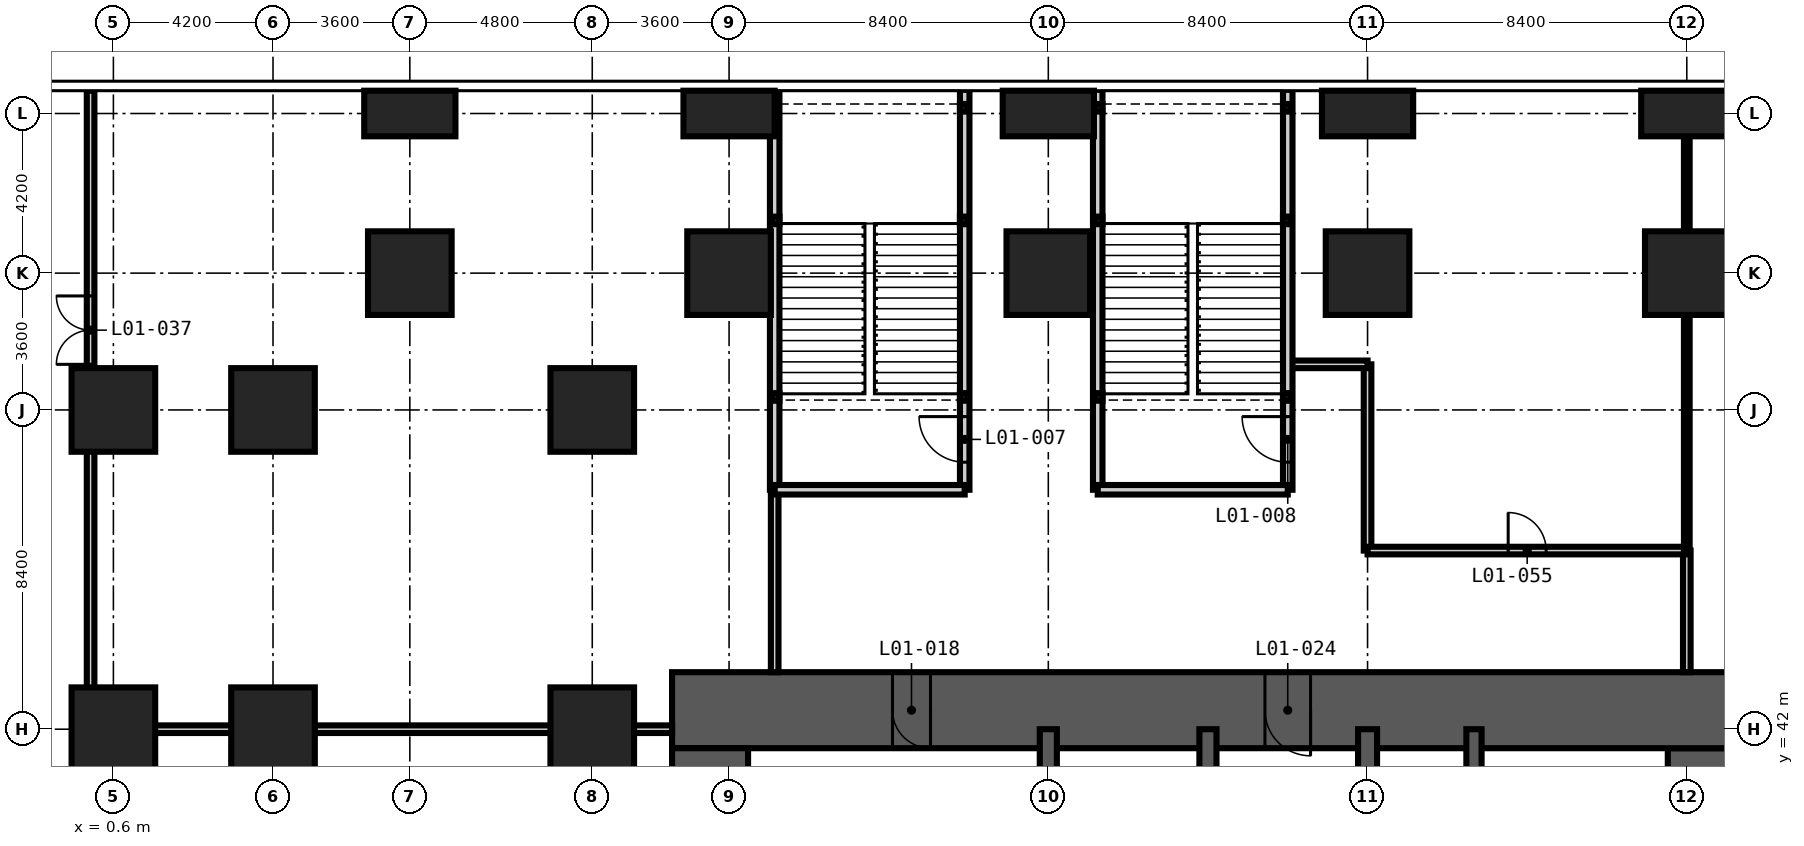
"""IFC4 building model, lengths in metres.
Left out: names, types, materials, properties, quantities, classifications, styles, units other than length and angle.
Written with IfcOpenShell. Run it as: python <this file> out.ifc"""

import sys

from ifc_helpers import new_model, si_unit, direction, frame, frame_2d, origin, origin_2d, place, context, subcontext, project, spatial, rectangle, hollow_rectangle, extrude, element, fill, save


model = new_model("IFC4")
c1 = context("Model", 3, precision=1e-05, world=origin(), true_north=direction((0.0, 1.0)))
c2 = subcontext(c1, "Body", "Model", "MODEL_VIEW")
j1 = project(units=[si_unit("LENGTHUNIT", "METRE"), si_unit("PLANEANGLEUNIT", "RADIAN")], contexts=[c1])
p1 = place(None, origin())
s1 = spatial("IfcSite", under=j1, at=p1, CompositionType="ELEMENT")
p2 = place(p1, origin())
s2 = spatial("IfcBuilding", under=s1, at=p2, CompositionType="ELEMENT")
p3 = place(p2, frame((0.0, 0.0, 6.0)))
s3 = spatial("IfcBuildingStorey", under=s2, at=p3, CompositionType="ELEMENT", Elevation=6.0)
for number, where, z_axis, x_axis in (
    (1, (0.6, 42.0, -0.3), (0.0, 0.0, 1.0), (1.0, 0.0, 0.0)),
    (2, (0.6, 50.4, -0.3), (0.0, 0.0, 1.0), (1.0, 0.0, 0.0)),
    (3, (4.8, 42.0, -0.3), (0.0, 0.0, 1.0), (1.0, 0.0, 0.0)),
    (4, (4.8, 50.4, -0.3), (0.0, 0.0, 1.0), (1.0, 0.0, 0.0)),
    (5, (8.4, 54.0, -0.3), (0.0, 0.0, 1.0), (1.0, 0.0, 0.0)),
):
    element("IfcColumn", number, at=place(p3, frame(where, z_axis=z_axis, x_axis=x_axis)), inside=s3, PredefinedType="COLUMN", context=c2, shape_type="SweptSolid", body=[
        extrude(rectangle(XDim=2.2, YDim=2.2, at=origin_2d()), origin(), (0.0, 0.0, 1.0), 6.0),
    ])
p4 = place(p3, frame((8.4, 58.2, -0.3), z_axis=(0.0, 0.0, 1.0), x_axis=(1.0, 0.0, 0.0)))
e6 = element("IfcColumn", 6, at=p4, inside=s3, PredefinedType="COLUMN", context=c2, shape_type="SweptSolid", body=[
    extrude(rectangle(XDim=2.4, YDim=1.2, at=origin_2d()), origin(), (0.0, 0.0, 1.0), 6.0),
])
for number, where, z_axis, x_axis in (
    (7, (13.2, 42.0, -0.3), (0.0, 0.0, 1.0), (1.0, 0.0, 0.0)),
    (8, (13.2, 50.4, -0.3), (0.0, 0.0, 1.0), (1.0, 0.0, 0.0)),
    (9, (16.8, 54.0, -0.3), (0.0, 0.0, 1.0), (1.0, 0.0, 0.0)),
):
    element("IfcColumn", number, at=place(p3, frame(where, z_axis=z_axis, x_axis=x_axis)), inside=s3, PredefinedType="COLUMN", context=c2, shape_type="SweptSolid", body=[
        extrude(rectangle(XDim=2.2, YDim=2.2, at=origin_2d()), origin(), (0.0, 0.0, 1.0), 6.0),
    ])
p5 = place(p3, frame((16.8, 58.2, -0.3), z_axis=(0.0, 0.0, 1.0), x_axis=(1.0, 0.0, 0.0)))
e10 = element("IfcColumn", 10, at=p5, inside=s3, PredefinedType="COLUMN", context=c2, shape_type="SweptSolid", body=[
    extrude(rectangle(XDim=2.4, YDim=1.2, at=origin_2d()), origin(), (0.0, 0.0, 1.0), 6.0),
])
p6 = place(p3, frame((25.2, 54.0, -0.3), z_axis=(0.0, 0.0, 1.0), x_axis=(1.0, 0.0, 0.0)))
e11 = element("IfcColumn", 11, at=p6, inside=s3, PredefinedType="COLUMN", context=c2, shape_type="SweptSolid", body=[
    extrude(rectangle(XDim=2.2, YDim=2.2, at=origin_2d()), origin(), (0.0, 0.0, 1.0), 6.0),
])
p7 = place(p3, frame((25.2, 58.2, -0.3), z_axis=(0.0, 0.0, 1.0), x_axis=(1.0, 0.0, 0.0)))
e12 = element("IfcColumn", 12, at=p7, inside=s3, PredefinedType="COLUMN", context=c2, shape_type="SweptSolid", body=[
    extrude(rectangle(XDim=2.4, YDim=1.2, at=origin_2d()), origin(), (0.0, 0.0, 1.0), 6.0),
])
p8 = place(p3, frame((33.6, 54.0, -0.3), z_axis=(0.0, 0.0, 1.0), x_axis=(1.0, 0.0, 0.0)))
e13 = element("IfcColumn", 13, at=p8, inside=s3, PredefinedType="COLUMN", context=c2, shape_type="SweptSolid", body=[
    extrude(rectangle(XDim=2.2, YDim=2.2, at=origin_2d()), origin(), (0.0, 0.0, 1.0), 6.0),
])
p9 = place(p3, frame((33.6, 58.2, -0.3), z_axis=(0.0, 0.0, 1.0), x_axis=(1.0, 0.0, 0.0)))
e14 = element("IfcColumn", 14, at=p9, inside=s3, PredefinedType="COLUMN", context=c2, shape_type="SweptSolid", body=[
    extrude(rectangle(XDim=2.4, YDim=1.2, at=origin_2d()), origin(), (0.0, 0.0, 1.0), 6.0),
])
p10 = place(p3, frame((42.0, 54.0, -0.3), z_axis=(0.0, 0.0, 1.0), x_axis=(1.0, 0.0, 0.0)))
e15 = element("IfcColumn", 15, at=p10, inside=s3, PredefinedType="COLUMN", context=c2, shape_type="SweptSolid", body=[
    extrude(rectangle(XDim=2.2, YDim=2.2, at=origin_2d()), origin(), (0.0, 0.0, 1.0), 6.0),
])
p11 = place(p3, frame((42.0, 58.2, -0.3), z_axis=(0.0, 0.0, 1.0), x_axis=(1.0, 0.0, 0.0)))
e16 = element("IfcColumn", 16, at=p11, inside=s3, PredefinedType="COLUMN", context=c2, shape_type="SweptSolid", body=[
    extrude(rectangle(XDim=2.4, YDim=1.2, at=origin_2d()), origin(), (0.0, 0.0, 1.0), 6.0),
])
p12 = place(p3, frame((42.5, 17.3, -0.3), z_axis=(0.0, 0.0, 1.0), x_axis=(0.0, 1.0, 0.0)))
e17 = element("IfcWall", 17, at=p12, inside=s3, PredefinedType="SHEAR", context=c2, shape_type="SweptSolid", body=[
    extrude(rectangle(XDim=24.2, YDim=2.0, at=frame_2d((12.1, 0.0))), origin(), (0.0, 0.0, 1.0), 6.0),
])
p13 = place(p12, frame((0.3, 0.0, 0.3)))
e18 = element("IfcOpeningElement", 18, at=p13, cuts=e17, PredefinedType="OPENING", context=c2, shape_type="SweptSolid", body=[
    extrude(rectangle(XDim=1.2, YDim=2.2, at=frame_2d((0.6, 1.1))), frame((0.0, 1.01, 0.0), z_axis=(0.0, -1.0, 0.0), x_axis=(1.0, 0.0, 0.0)), (0.0, 0.0, 1.0), 2.02),
])
p14 = place(p12, frame((11.6, 0.0, 0.3)))
e19 = element("IfcOpeningElement", 19, at=p14, cuts=e17, PredefinedType="OPENING", context=c2, shape_type="SweptSolid", body=[
    extrude(rectangle(XDim=1.0, YDim=2.1, at=frame_2d((0.5, 1.05))), frame((0.0, 1.01, 0.0), z_axis=(0.0, -1.0, 0.0), x_axis=(1.0, 0.0, 0.0)), (0.0, 0.0, 1.0), 2.02),
])
p15 = place(p12, frame((20.0, 0.0, 0.3)))
e20 = element("IfcOpeningElement", 20, at=p15, cuts=e17, PredefinedType="OPENING", context=c2, shape_type="SweptSolid", body=[
    extrude(rectangle(XDim=1.0, YDim=2.1, at=frame_2d((0.5, 1.05))), frame((0.0, 1.01, 0.0), z_axis=(0.0, -1.0, 0.0), x_axis=(1.0, 0.0, 0.0)), (0.0, 0.0, 1.0), 2.02),
])
p16 = place(p3, frame((43.5, 42.5, -0.3), z_axis=(0.0, 0.0, 1.0), x_axis=(-1.0, 0.0, 0.0)))
e21 = element("IfcWall", 21, at=p16, inside=s3, PredefinedType="SHEAR", context=c2, shape_type="SweptSolid", body=[
    extrude(rectangle(XDim=28.2, YDim=2.0, at=frame_2d((14.1, 0.0))), origin(), (0.0, 0.0, 1.0), 6.0),
])
p17 = place(p16, frame((21.4, 0.0, 0.3)))
e22 = element("IfcOpeningElement", 22, at=p17, cuts=e21, PredefinedType="OPENING", context=c2, shape_type="SweptSolid", body=[
    extrude(rectangle(XDim=1.0, YDim=2.1, at=frame_2d((0.5, 1.05))), frame((0.0, 1.01, 0.0), z_axis=(0.0, -1.0, 0.0), x_axis=(1.0, 0.0, 0.0)), (0.0, 0.0, 1.0), 2.02),
])
p18 = place(p16, frame((11.4, 0.0, 0.3)))
e23 = element("IfcOpeningElement", 23, at=p18, cuts=e21, PredefinedType="OPENING", context=c2, shape_type="SweptSolid", body=[
    extrude(rectangle(XDim=1.2, YDim=2.2, at=frame_2d((0.6, 1.1))), frame((0.0, 1.01, 0.0), z_axis=(0.0, -1.0, 0.0), x_axis=(1.0, 0.0, 0.0)), (0.0, 0.0, 1.0), 2.02),
])
p19 = place(p3, frame((16.3, 41.5, -0.3), z_axis=(0.0, 0.0, 1.0), x_axis=(0.0, -1.0, 0.0)))
e24 = element("IfcWall", 24, at=p19, inside=s3, PredefinedType="SHEAR", context=c2, shape_type="SweptSolid", body=[
    extrude(rectangle(XDim=24.2, YDim=2.0, at=frame_2d((12.1, 0.0))), origin(), (0.0, 0.0, 1.0), 6.0),
])
p20 = place(p19, frame((11.2, 0.0, 0.3)))
e25 = element("IfcOpeningElement", 25, at=p20, cuts=e24, PredefinedType="OPENING", context=c2, shape_type="SweptSolid", body=[
    extrude(rectangle(XDim=1.8, YDim=2.2, at=frame_2d((0.9, 1.1))), frame((0.0, 1.01, 0.0), z_axis=(0.0, -1.0, 0.0), x_axis=(1.0, 0.0, 0.0)), (0.0, 0.0, 1.0), 2.02),
])
p21 = place(p19, frame((20.0, 0.0, 0.3)))
e26 = element("IfcOpeningElement", 26, at=p21, cuts=e24, PredefinedType="OPENING", context=c2, shape_type="SweptSolid", body=[
    extrude(rectangle(XDim=1.0, YDim=2.1, at=frame_2d((0.5, 1.05))), frame((0.0, 1.01, 0.0), z_axis=(0.0, -1.0, 0.0), x_axis=(1.0, 0.0, 0.0)), (0.0, 0.0, 1.0), 2.02),
])
p22 = place(p19, frame((5.3, 0.0, 0.3)))
e27 = element("IfcOpeningElement", 27, at=p22, cuts=e24, PredefinedType="OPENING", context=c2, shape_type="SweptSolid", body=[
    extrude(rectangle(XDim=1.0, YDim=2.1, at=frame_2d((0.5, 1.05))), frame((0.0, 1.01, 0.0), z_axis=(0.0, -1.0, 0.0), x_axis=(1.0, 0.0, 0.0)), (0.0, 0.0, 1.0), 2.02),
])
p23 = place(p3, frame((36.4, 33.6, -0.3), z_axis=(0.0, 0.0, 1.0), x_axis=(0.0, 1.0, 0.0)))
e28 = element("IfcWall", 28, at=p23, inside=s3, PredefinedType="SHEAR", context=c2, shape_type="SweptSolid", body=[
    extrude(rectangle(XDim=8.4, YDim=0.4, at=frame_2d((4.2, 0.0))), origin(), (0.0, 0.0, 1.0), 6.0),
])
p24 = place(p3, frame((25.2, 16.8, -0.3), z_axis=(0.0, 0.0, 1.0), x_axis=(0.0, 1.0, 0.0)))
e29 = element("IfcWall", 29, at=p24, inside=s3, PredefinedType="SHEAR", context=c2, shape_type="SweptSolid", body=[
    extrude(rectangle(XDim=25.2, YDim=0.45, at=frame_2d((12.6, 0.0))), origin(), (0.0, 0.0, 1.0), 6.0),
])
p25 = place(p3, frame((29.4, 33.6, -0.3), z_axis=(0.0, 0.0, 1.0), x_axis=(0.0, 1.0, 0.0)))
e30 = element("IfcWall", 30, at=p25, inside=s3, PredefinedType="SHEAR", context=c2, shape_type="SweptSolid", body=[
    extrude(rectangle(XDim=8.4, YDim=0.45, at=frame_2d((4.2, 0.0))), origin(), (0.0, 0.0, 1.0), 6.0),
])
p26 = place(p25, frame((0.525, 0.0, 0.3)))
e31 = element("IfcOpeningElement", 31, at=p26, cuts=e30, PredefinedType="OPENING", context=c2, shape_type="SweptSolid", body=[
    extrude(rectangle(XDim=1.2, YDim=2.2, at=frame_2d((0.6, 1.1))), frame((0.0, 0.235, 0.0), z_axis=(0.0, -1.0, 0.0), x_axis=(1.0, 0.0, 0.0)), (0.0, 0.0, 1.0), 0.47),
])
p27 = place(p3, frame((33.6, 16.8, -0.3), z_axis=(0.0, 0.0, 1.0), x_axis=(0.0, 1.0, 0.0)))
e32 = element("IfcWall", 32, at=p27, inside=s3, PredefinedType="SHEAR", context=c2, shape_type="SweptSolid", body=[
    extrude(rectangle(XDim=25.2, YDim=0.5, at=frame_2d((12.6, 0.0))), origin(), (0.0, 0.0, 1.0), 6.0),
])
p28 = place(p27, frame((22.5, 0.0, 0.3)))
e33 = element("IfcOpeningElement", 33, at=p28, cuts=e32, PredefinedType="OPENING", context=c2, shape_type="SweptSolid", body=[
    extrude(rectangle(XDim=1.2, YDim=2.2, at=frame_2d((0.6, 1.1))), frame((0.0, 0.26, 0.0), z_axis=(0.0, -1.0, 0.0), x_axis=(1.0, 0.0, 0.0)), (0.0, 0.0, 1.0), 0.52),
])
p29 = place(p27, frame((18.3, 0.0, 0.3)))
e34 = element("IfcOpeningElement", 34, at=p29, cuts=e32, PredefinedType="OPENING", context=c2, shape_type="SweptSolid", body=[
    extrude(rectangle(XDim=1.2, YDim=2.2, at=frame_2d((0.6, 1.1))), frame((0.0, 0.26, 0.0), z_axis=(0.0, -1.0, 0.0), x_axis=(1.0, 0.0, 0.0)), (0.0, 0.0, 1.0), 0.52),
])
p30 = place(p27, frame((12.1, 0.0, 0.3)))
e35 = element("IfcOpeningElement", 35, at=p30, cuts=e32, PredefinedType="OPENING", context=c2, shape_type="SweptSolid", body=[
    extrude(rectangle(XDim=1.0, YDim=2.1, at=frame_2d((0.5, 1.05))), frame((0.0, 0.26, 0.0), z_axis=(0.0, -1.0, 0.0), x_axis=(1.0, 0.0, 0.0)), (0.0, 0.0, 1.0), 0.52),
])
p31 = place(p3, frame((0.0, 42.0, 0.0), z_axis=(0.0, 0.0, 1.0), x_axis=(0.0, 1.0, 0.0)))
e36 = element("IfcWall", 36, at=p31, inside=s3, PredefinedType="PARTITIONING", context=c2, shape_type="SweptSolid", body=[
    extrude(rectangle(XDim=16.8, YDim=0.2, at=frame_2d((8.4, 0.0))), origin(), (0.0, 0.0, 1.0), 5.7),
])
p32 = place(p31, frame((9.6, 0.0, 0.0)))
e37 = element("IfcOpeningElement", 37, at=p32, cuts=e36, PredefinedType="OPENING", context=c2, shape_type="SweptSolid", body=[
    extrude(rectangle(XDim=1.8, YDim=2.4, at=frame_2d((0.9, 1.2))), frame((0.0, 0.11, 0.0), z_axis=(0.0, -1.0, 0.0), x_axis=(1.0, 0.0, 0.0)), (0.0, 0.0, 1.0), 0.22),
])
p33 = place(p3, frame((33.6, 46.7, 0.0), z_axis=(0.0, 0.0, 1.0), x_axis=(0.0, 1.0, 0.0)))
e38 = element("IfcWall", 38, at=p33, inside=s3, PredefinedType="PARTITIONING", context=c2, shape_type="SweptSolid", body=[
    extrude(rectangle(XDim=4.9, YDim=0.2, at=frame_2d((2.45, 0.0))), origin(), (0.0, 0.0, 1.0), 5.7),
])
p34 = place(p3, frame((42.0, 43.5, 0.0), z_axis=(0.0, 0.0, 1.0), x_axis=(0.0, 1.0, 0.0)))
e39 = element("IfcWall", 39, at=p34, inside=s3, PredefinedType="PARTITIONING", context=c2, shape_type="SweptSolid", body=[
    extrude(rectangle(XDim=3.2, YDim=0.2, at=frame_2d((1.6, 0.0))), origin(), (0.0, 0.0, 1.0), 5.7),
])
p35 = place(p3, frame((33.6, 46.7, 0.0), z_axis=(0.0, 0.0, 1.0), x_axis=(1.0, 0.0, 0.0)))
e40 = element("IfcWall", 40, at=p35, inside=s3, PredefinedType="PARTITIONING", context=c2, shape_type="SweptSolid", body=[
    extrude(rectangle(XDim=8.4, YDim=0.2, at=frame_2d((4.2, 0.0))), origin(), (0.0, 0.0, 1.0), 5.7),
])
p36 = place(p35, frame((3.7, 0.0, 0.0)))
e41 = element("IfcOpeningElement", 41, at=p36, cuts=e40, PredefinedType="OPENING", context=c2, shape_type="SweptSolid", body=[
    extrude(rectangle(XDim=1.0, YDim=2.1, at=frame_2d((0.5, 1.05))), frame((0.0, 0.11, 0.0), z_axis=(0.0, -1.0, 0.0), x_axis=(1.0, 0.0, 0.0)), (0.0, 0.0, 1.0), 0.22),
])
p37 = place(p3, frame((31.5, 51.6, 0.0), z_axis=(0.0, 0.0, 1.0), x_axis=(1.0, 0.0, 0.0)))
e42 = element("IfcWall", 42, at=p37, inside=s3, PredefinedType="PARTITIONING", context=c2, shape_type="SweptSolid", body=[
    extrude(rectangle(XDim=2.1, YDim=0.2, at=frame_2d((1.05, 0.0))), origin(), (0.0, 0.0, 1.0), 5.7),
])
p38 = place(p3, frame((18.0, 48.3, 0.0), z_axis=(0.0, 0.0, 1.0), x_axis=(0.0, -1.0, 0.0)))
e43 = element("IfcWall", 43, at=p38, inside=s3, PredefinedType="PARTITIONING", context=c2, shape_type="SweptSolid", body=[
    extrude(rectangle(XDim=4.8, YDim=0.2, at=frame_2d((2.4, 0.0))), origin(), (0.0, 0.0, 1.0), 5.7),
])
p39 = place(p3, frame((15.3, 42.0, 0.0), z_axis=(0.0, 0.0, 1.0), x_axis=(-1.0, 0.0, 0.0)))
e44 = element("IfcWall", 44, at=p39, inside=s3, PredefinedType="PARTITIONING", context=c2, shape_type="SweptSolid", body=[
    extrude(rectangle(XDim=15.3, YDim=0.2, at=frame_2d((7.65, 0.0))), origin(), (0.0, 0.0, 1.0), 5.7),
])
p40 = place(p3, frame((42.0, 46.7, 0.0), z_axis=(0.0, 0.0, 1.0), x_axis=(0.0, 1.0, 0.0)))
e45 = element("IfcWall", 45, at=p40, inside=s3, PredefinedType="PARTITIONING", context=c2, shape_type="SweptSolid", body=[
    extrude(rectangle(XDim=12.1, YDim=0.15, at=frame_2d((6.05, 0.0))), origin(), (0.0, 0.0, 1.0), 5.7),
])
p41 = place(p3, frame((18.0, 48.3, 0.0), z_axis=(0.0, 0.0, 1.0), x_axis=(0.0, 1.0, 0.0)))
e46 = element("IfcWall", 46, at=p41, inside=s3, PredefinedType="PARTITIONING", context=c2, shape_type="SweptSolid", body=[
    extrude(rectangle(XDim=10.523, YDim=0.25, at=frame_2d((5.261, 0.0))), origin(), (0.0, 0.0, 1.0), 5.7),
])
p42 = place(p3, frame((23.0, 48.3, 0.0), z_axis=(0.0, 0.0, 1.0), x_axis=(0.0, 1.0, 0.0)))
e47 = element("IfcWall", 47, at=p42, inside=s3, PredefinedType="PARTITIONING", context=c2, shape_type="SweptSolid", body=[
    extrude(rectangle(XDim=10.523, YDim=0.25, at=frame_2d((5.261, 0.0))), origin(), (0.0, 0.0, 1.0), 5.7),
])
p43 = place(p42, frame((0.725, 0.0, 0.0)))
e48 = element("IfcOpeningElement", 48, at=p43, cuts=e47, PredefinedType="OPENING", context=c2, shape_type="SweptSolid", body=[
    extrude(rectangle(XDim=1.2, YDim=2.2, at=frame_2d((0.6, 1.1))), frame((0.0, 0.135, 0.0), z_axis=(0.0, -1.0, 0.0), x_axis=(1.0, 0.0, 0.0)), (0.0, 0.0, 1.0), 0.27),
])
p44 = place(p3, frame((26.5, 48.3, 0.0), z_axis=(0.0, 0.0, 1.0), x_axis=(0.0, 1.0, 0.0)))
e49 = element("IfcWall", 49, at=p44, inside=s3, PredefinedType="PARTITIONING", context=c2, shape_type="SweptSolid", body=[
    extrude(rectangle(XDim=10.523, YDim=0.25, at=frame_2d((5.261, 0.0))), origin(), (0.0, 0.0, 1.0), 5.7),
])
p45 = place(p3, frame((31.5, 48.3, 0.0), z_axis=(0.0, 0.0, 1.0), x_axis=(0.0, 1.0, 0.0)))
e50 = element("IfcWall", 50, at=p45, inside=s3, PredefinedType="PARTITIONING", context=c2, shape_type="SweptSolid", body=[
    extrude(rectangle(XDim=10.523, YDim=0.25, at=frame_2d((5.261, 0.0))), origin(), (0.0, 0.0, 1.0), 5.7),
])
p46 = place(p45, frame((0.725, 0.0, 0.0)))
e51 = element("IfcOpeningElement", 51, at=p46, cuts=e50, PredefinedType="OPENING", context=c2, shape_type="SweptSolid", body=[
    extrude(rectangle(XDim=1.2, YDim=2.2, at=frame_2d((0.6, 1.1))), frame((0.0, 0.135, 0.0), z_axis=(0.0, -1.0, 0.0), x_axis=(1.0, 0.0, 0.0)), (0.0, 0.0, 1.0), 0.27),
])
for number, where, z_axis, x_axis in (
    (52, (18.0, 48.3, 0.0), (0.0, 0.0, 1.0), (1.0, 0.0, 0.0)),
    (53, (26.5, 48.3, 0.0), (0.0, 0.0, 1.0), (1.0, 0.0, 0.0)),
):
    element("IfcWall", number, at=place(p3, frame(where, z_axis=z_axis, x_axis=x_axis)), inside=s3, PredefinedType="PARTITIONING", context=c2, shape_type="SweptSolid", body=[
        extrude(rectangle(XDim=5.0, YDim=0.25, at=frame_2d((2.5, 0.0))), origin(), (0.0, 0.0, 1.0), 5.7),
    ])
for number, where, z_axis, x_axis in (
    (54, (18.025, 50.742, -0.3), (0.0, 0.0, 1.0), (1.0, 0.0, 0.0)),
    (55, (22.975, 50.742, -0.3), (0.0, 0.0, 1.0), (1.0, 0.0, 0.0)),
    (56, (18.025, 55.387, -0.3), (0.0, 0.0, 1.0), (1.0, 0.0, 0.0)),
    (57, (22.975, 55.387, -0.3), (0.0, 0.0, 1.0), (1.0, 0.0, 0.0)),
    (58, (22.975, 58.35, -0.3), (0.0, 0.0, 1.0), (1.0, 0.0, 0.0)),
    (59, (26.525, 50.742, -0.3), (0.0, 0.0, 1.0), (1.0, 0.0, 0.0)),
    (60, (31.475, 50.742, -0.3), (0.0, 0.0, 1.0), (1.0, 0.0, 0.0)),
    (61, (26.525, 55.387, -0.3), (0.0, 0.0, 1.0), (1.0, 0.0, 0.0)),
    (62, (31.475, 55.387, -0.3), (0.0, 0.0, 1.0), (1.0, 0.0, 0.0)),
    (63, (26.525, 58.35, -0.3), (0.0, 0.0, 1.0), (1.0, 0.0, 0.0)),
    (64, (31.475, 58.35, -0.3), (0.0, 0.0, 1.0), (1.0, 0.0, 0.0)),
):
    element("IfcColumn", number, at=place(p3, frame(where, z_axis=z_axis, x_axis=x_axis)), inside=s3, PredefinedType="COLUMN", context=c2, shape_type="SweptSolid", body=[
        extrude(hollow_rectangle(XDim=0.2, YDim=0.2, WallThickness=0.01, at=origin_2d()), origin(), (0.0, 0.0, 1.0), 6.0),
    ])
p47 = place(p43, origin())
e65 = element("IfcDoor", 65, at=p47, inside=s3, OperationType="SINGLE_SWING_RIGHT", PredefinedType="DOOR", context=c2, shape_type="SweptSolid", body=[
    extrude(rectangle(XDim=1.2, YDim=2.2, at=frame_2d((0.6, 1.1))), frame((0.0, 0.025, 0.0), z_axis=(0.0, -1.0, 0.0), x_axis=(1.0, 0.0, 0.0)), (0.0, 0.0, 1.0), 0.05),
])
fill(e48, e65)
p48 = place(p46, origin())
e66 = element("IfcDoor", 66, at=p48, inside=s3, OperationType="SINGLE_SWING_RIGHT", PredefinedType="DOOR", context=c2, shape_type="SweptSolid", body=[
    extrude(rectangle(XDim=1.2, YDim=2.2, at=frame_2d((0.6, 1.1))), frame((0.0, 0.025, 0.0), z_axis=(0.0, -1.0, 0.0), x_axis=(1.0, 0.0, 0.0)), (0.0, 0.0, 1.0), 0.05),
])
fill(e51, e66)
p49 = place(p17, origin())
e67 = element("IfcDoor", 67, at=p49, inside=s3, OperationType="SINGLE_SWING_LEFT", PredefinedType="DOOR", context=c2, shape_type="SweptSolid", body=[
    extrude(rectangle(XDim=1.0, YDim=2.1, at=frame_2d((0.5, 1.05))), frame((0.0, 0.025, 0.0), z_axis=(0.0, -1.0, 0.0), x_axis=(1.0, 0.0, 0.0)), (0.0, 0.0, 1.0), 0.05),
])
fill(e22, e67)
p50 = place(p18, origin())
e68 = element("IfcDoor", 68, at=p50, inside=s3, OperationType="SINGLE_SWING_LEFT", PredefinedType="DOOR", context=c2, shape_type="SweptSolid", body=[
    extrude(rectangle(XDim=1.2, YDim=2.2, at=frame_2d((0.6, 1.1))), frame((0.0, 0.025, 0.0), z_axis=(0.0, -1.0, 0.0), x_axis=(1.0, 0.0, 0.0)), (0.0, 0.0, 1.0), 0.05),
])
fill(e23, e68)
p51 = place(p32, origin())
e69 = element("IfcDoor", 69, at=p51, inside=s3, OperationType="DOUBLE_DOOR_DOUBLE_SWING", PredefinedType="DOOR", context=c2, shape_type="SweptSolid", body=[
    extrude(rectangle(XDim=1.8, YDim=2.4, at=frame_2d((0.9, 1.2))), frame((0.0, 0.025, 0.0), z_axis=(0.0, -1.0, 0.0), x_axis=(1.0, 0.0, 0.0)), (0.0, 0.0, 1.0), 0.05),
])
fill(e37, e69)
p52 = place(p36, origin())
e70 = element("IfcDoor", 70, at=p52, inside=s3, OperationType="SINGLE_SWING_LEFT", PredefinedType="DOOR", context=c2, shape_type="SweptSolid", body=[
    extrude(rectangle(XDim=1.0, YDim=2.1, at=frame_2d((0.5, 1.05))), frame((0.0, 0.025, 0.0), z_axis=(0.0, -1.0, 0.0), x_axis=(1.0, 0.0, 0.0)), (0.0, 0.0, 1.0), 0.05),
])
fill(e41, e70)
save(model, sys.argv[1])
